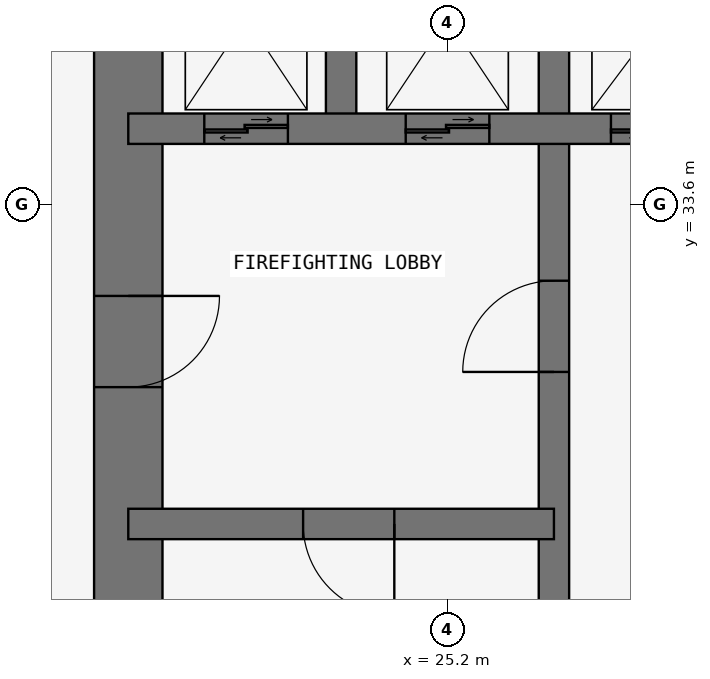
"""IFC4 building model, lengths in metres.
Left out: names, types, materials, properties, quantities, classifications, styles, units other than length and angle.
Written with IfcOpenShell. Run it as: python <this file> out.ifc"""

import sys

from ifc_helpers import new_model, si_unit, direction, frame, frame_2d, origin, place, context, subcontext, project, spatial, rectangle, extrude, element, fill, save


model = new_model("IFC4")
c1 = context("Model", 3, precision=1e-05, world=origin(), true_north=direction((0.0, 1.0)))
c2 = subcontext(c1, "Body", "Model", "MODEL_VIEW")
j1 = project(units=[si_unit("LENGTHUNIT", "METRE"), si_unit("PLANEANGLEUNIT", "RADIAN")], contexts=[c1])
p1 = place(None, origin())
s1 = spatial("IfcSite", under=j1, at=p1, CompositionType="ELEMENT")
p2 = place(p1, origin())
s2 = spatial("IfcBuilding", under=s1, at=p2, CompositionType="ELEMENT")
p3 = place(p2, frame((0.0, 0.0, 119.7)))
s3 = spatial("IfcBuildingStorey", under=s2, at=p3, CompositionType="ELEMENT", Elevation=119.7)
p4 = place(p3, frame((21.0, 37.8, 0.0), z_axis=(0.0, 0.0, 1.0), x_axis=(0.0, -1.0, 0.0)))
e1 = element("IfcWall", 1, at=p4, inside=s3, PredefinedType="SHEAR", context=c2, shape_type="SweptSolid", body=[
    extrude(rectangle(XDim=17.25, YDim=0.9, at=frame_2d((8.625, 0.0))), origin(), (0.0, 0.0, 1.0), 3.6),
])
p5 = place(p4, frame((5.4, 0.0, 0.0)))
e2 = element("IfcOpeningElement", 2, at=p5, cuts=e1, PredefinedType="OPENING", context=c2, shape_type="SweptSolid", body=[
    extrude(rectangle(XDim=1.2, YDim=2.1, at=frame_2d((0.6, 1.05))), frame((0.0, 0.46, 0.0), z_axis=(0.0, -1.0, 0.0), x_axis=(1.0, 0.0, 0.0)), (0.0, 0.0, 1.0), 0.92),
])
p6 = place(p3, frame((26.6, 21.0, 0.0), z_axis=(0.0, 0.0, 1.0), x_axis=(0.0, 1.0, 0.0)))
e3 = element("IfcWall", 3, at=p6, inside=s3, PredefinedType="SHEAR", context=c2, shape_type="SweptSolid", body=[
    extrude(rectangle(XDim=16.8, YDim=0.4, at=frame_2d((8.4, 0.0))), origin(), (0.0, 0.0, 1.0), 3.6),
])
p7 = place(p6, frame((10.4, 0.0, 0.0)))
e4 = element("IfcOpeningElement", 4, at=p7, cuts=e3, PredefinedType="OPENING", context=c2, shape_type="SweptSolid", body=[
    extrude(rectangle(XDim=1.2, YDim=2.1, at=frame_2d((0.6, 1.05))), frame((0.0, 0.21, 0.0), z_axis=(0.0, -1.0, 0.0), x_axis=(1.0, 0.0, 0.0)), (0.0, 0.0, 1.0), 0.42),
])
p8 = place(p3, frame((21.0, 29.4, 0.0), z_axis=(0.0, 0.0, 1.0), x_axis=(1.0, 0.0, 0.0)))
e5 = element("IfcWall", 5, at=p8, inside=s3, PredefinedType="SHEAR", context=c2, shape_type="SweptSolid", body=[
    extrude(rectangle(XDim=5.6, YDim=0.4, at=frame_2d((2.8, 0.0))), origin(), (0.0, 0.0, 1.0), 3.6),
])
p9 = place(p8, frame((2.3, 0.0, 0.0)))
e6 = element("IfcOpeningElement", 6, at=p9, cuts=e5, PredefinedType="OPENING", context=c2, shape_type="SweptSolid", body=[
    extrude(rectangle(XDim=1.2, YDim=2.1, at=frame_2d((0.6, 1.05))), frame((0.0, 0.21, 0.0), z_axis=(0.0, -1.0, 0.0), x_axis=(1.0, 0.0, 0.0)), (0.0, 0.0, 1.0), 0.42),
])
p10 = place(p3, frame((21.0, 34.6, 0.0), z_axis=(0.0, 0.0, 1.0), x_axis=(1.0, 0.0, 0.0)))
e7 = element("IfcWall", 7, at=p10, inside=s3, PredefinedType="SHEAR", context=c2, shape_type="SweptSolid", body=[
    extrude(rectangle(XDim=11.2, YDim=0.4, at=frame_2d((5.6, 0.0))), origin(), (0.0, 0.0, 1.0), 3.6),
])
p11 = place(p10, frame((9.35, 0.0, 0.0)))
e8 = element("IfcOpeningElement", 8, at=p11, cuts=e7, PredefinedType="OPENING", context=c2, shape_type="SweptSolid", body=[
    extrude(rectangle(XDim=0.9, YDim=2.1, at=frame_2d((0.45, 1.05))), frame((0.0, 0.21, 0.0), z_axis=(0.0, -1.0, 0.0), x_axis=(1.0, 0.0, 0.0)), (0.0, 0.0, 1.0), 0.42),
])
p12 = place(p10, frame((1.0, 0.0, 0.0)))
e9 = element("IfcOpeningElement", 9, at=p12, cuts=e7, PredefinedType="OPENING", context=c2, shape_type="SweptSolid", body=[
    extrude(rectangle(XDim=1.1, YDim=2.1, at=frame_2d((0.55, 1.05))), frame((0.0, 0.21, 0.0), z_axis=(0.0, -1.0, 0.0), x_axis=(1.0, 0.0, 0.0)), (0.0, 0.0, 1.0), 0.42),
])
p13 = place(p10, frame((3.65, 0.0, 0.0)))
e10 = element("IfcOpeningElement", 10, at=p13, cuts=e7, PredefinedType="OPENING", context=c2, shape_type="SweptSolid", body=[
    extrude(rectangle(XDim=1.1, YDim=2.1, at=frame_2d((0.55, 1.05))), frame((0.0, 0.21, 0.0), z_axis=(0.0, -1.0, 0.0), x_axis=(1.0, 0.0, 0.0)), (0.0, 0.0, 1.0), 0.42),
])
p14 = place(p10, frame((6.35, 0.0, 0.0)))
e11 = element("IfcOpeningElement", 11, at=p14, cuts=e7, PredefinedType="OPENING", context=c2, shape_type="SweptSolid", body=[
    extrude(rectangle(XDim=1.3, YDim=2.1, at=frame_2d((0.65, 1.05))), frame((0.0, 0.21, 0.0), z_axis=(0.0, -1.0, 0.0), x_axis=(1.0, 0.0, 0.0)), (0.0, 0.0, 1.0), 0.42),
])
p15 = place(p3, frame((23.8, 34.6, 0.0), z_axis=(0.0, 0.0, 1.0), x_axis=(0.0, 1.0, 0.0)))
e12 = element("IfcWall", 12, at=p15, inside=s3, PredefinedType="SHEAR", context=c2, shape_type="SweptSolid", body=[
    extrude(rectangle(XDim=3.2, YDim=0.4, at=frame_2d((1.6, 0.0))), origin(), (0.0, 0.0, 1.0), 3.6),
])
p16 = place(p5, origin())
e13 = element("IfcDoor", 13, at=p16, inside=s3, OperationType="SINGLE_SWING_LEFT", PredefinedType="DOOR", context=c2, shape_type="SweptSolid", body=[
    extrude(rectangle(XDim=1.2, YDim=2.1, at=frame_2d((0.6, 1.05))), frame((0.0, 0.025, 0.0), z_axis=(0.0, -1.0, 0.0), x_axis=(1.0, 0.0, 0.0)), (0.0, 0.0, 1.0), 0.05),
])
fill(e2, e13)
p17 = place(p9, frame((1.2, 0.0, 0.0), z_axis=(0.0, 0.0, 1.0), x_axis=(-1.0, 0.0, 0.0)))
e14 = element("IfcDoor", 14, at=p17, inside=s3, OperationType="SINGLE_SWING_LEFT", PredefinedType="DOOR", context=c2, shape_type="SweptSolid", body=[
    extrude(rectangle(XDim=1.2, YDim=2.1, at=frame_2d((0.6, 1.05))), frame((0.0, 0.025, 0.0), z_axis=(0.0, -1.0, 0.0), x_axis=(1.0, 0.0, 0.0)), (0.0, 0.0, 1.0), 0.05),
])
fill(e6, e14)
p18 = place(p7, origin())
e15 = element("IfcDoor", 15, at=p18, inside=s3, OperationType="SINGLE_SWING_LEFT", PredefinedType="DOOR", context=c2, shape_type="SweptSolid", body=[
    extrude(rectangle(XDim=1.2, YDim=2.1, at=frame_2d((0.6, 1.05))), frame((0.0, 0.025, 0.0), z_axis=(0.0, -1.0, 0.0), x_axis=(1.0, 0.0, 0.0)), (0.0, 0.0, 1.0), 0.05),
])
fill(e4, e15)
p19 = place(p12, origin())
e16 = element("IfcDoor", 16, at=p19, inside=s3, OperationType="DOUBLE_DOOR_SLIDING", PredefinedType="DOOR", context=c2, shape_type="SweptSolid", body=[
    extrude(rectangle(XDim=1.1, YDim=2.1, at=frame_2d((0.55, 1.05))), frame((0.0, 0.025, 0.0), z_axis=(0.0, -1.0, 0.0), x_axis=(1.0, 0.0, 0.0)), (0.0, 0.0, 1.0), 0.05),
])
fill(e9, e16)
p20 = place(p13, origin())
e17 = element("IfcDoor", 17, at=p20, inside=s3, OperationType="DOUBLE_DOOR_SLIDING", PredefinedType="DOOR", context=c2, shape_type="SweptSolid", body=[
    extrude(rectangle(XDim=1.1, YDim=2.1, at=frame_2d((0.55, 1.05))), frame((0.0, 0.025, 0.0), z_axis=(0.0, -1.0, 0.0), x_axis=(1.0, 0.0, 0.0)), (0.0, 0.0, 1.0), 0.05),
])
fill(e10, e17)
p21 = place(p14, origin())
e18 = element("IfcDoor", 18, at=p21, inside=s3, OperationType="DOUBLE_DOOR_SLIDING", PredefinedType="DOOR", context=c2, shape_type="SweptSolid", body=[
    extrude(rectangle(XDim=1.3, YDim=2.1, at=frame_2d((0.65, 1.05))), frame((0.0, 0.025, 0.0), z_axis=(0.0, -1.0, 0.0), x_axis=(1.0, 0.0, 0.0)), (0.0, 0.0, 1.0), 0.05),
])
fill(e11, e18)
save(model, sys.argv[1])
